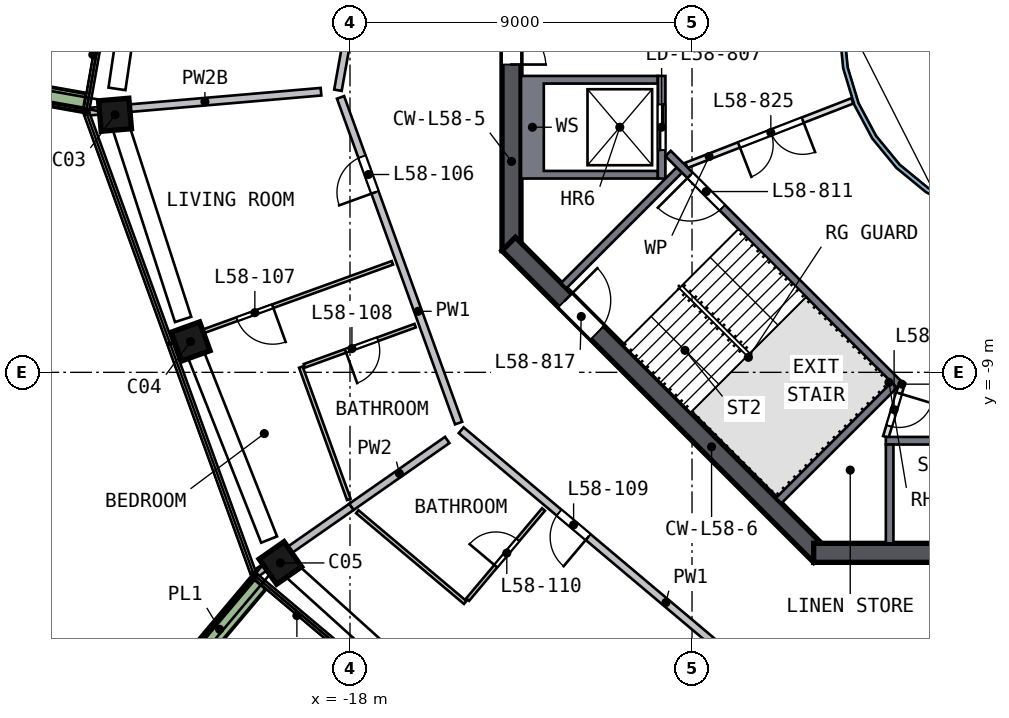
"""IFC4 building model, lengths in metres.
Left out: names, types, materials, properties, quantities, classifications, styles, units other than length and angle.
Written with IfcOpenShell. Run it as: python <this file> out.ifc"""

import sys

from ifc_helpers import new_model, si_unit, direction, frame, frame_2d, origin, origin_2d, place, context, subcontext, project, spatial, polyline, rectangle, outline, extrude, element, fill, save


model = new_model("IFC4")
c1 = context("Model", 3, precision=1e-05, world=origin(), true_north=direction((0.0, 1.0)))
c2 = subcontext(c1, "Body", "Model", "MODEL_VIEW")
j1 = project(units=[si_unit("LENGTHUNIT", "METRE"), si_unit("PLANEANGLEUNIT", "RADIAN")], contexts=[c1])
p1 = place(None, origin())
s1 = spatial("IfcSite", under=j1, at=p1, CompositionType="ELEMENT")
p2 = place(p1, origin())
s2 = spatial("IfcBuilding", under=s1, at=p2, CompositionType="ELEMENT")
p3 = place(p2, frame((0.0, 0.0, 237.5)))
s3 = spatial("IfcBuildingStorey", under=s2, at=p3, CompositionType="ELEMENT", Elevation=237.5)
p4 = place(p3, frame((-24.196, -2.083, 0.0), z_axis=(0.010795228, -0.114946373, 0.993313039), x_axis=(-0.084478949, 0.98971463, 0.115448074)))
e1 = element("IfcColumn", 1, at=p4, inside=s3, PredefinedType="COLUMN", context=c2, shape_type="SweptSolid", body=[
    extrude(rectangle(XDim=0.8, YDim=0.8, at=origin_2d()), origin(), (0.0, 0.0, 1.0), 3.211),
])
p5 = place(p3, frame((-22.243, -8.061, 0.0), z_axis=(0.039240919, -0.105478981, 0.993646987), x_axis=(0.338548583, -0.93419489, -0.112537837)))
e2 = element("IfcColumn", 2, at=p5, inside=s3, PredefinedType="COLUMN", context=c2, shape_type="SweptSolid", body=[
    extrude(rectangle(XDim=0.8, YDim=0.8, at=origin_2d()), origin(), (0.0, 0.0, 1.0), 3.21),
])
p6 = place(p3, frame((-19.913, -13.902, 0.0), z_axis=(0.066824181, -0.094116423, 0.993315976), x_axis=(-0.568164298, 0.814780281, 0.115422808)))
e3 = element("IfcColumn", 3, at=p6, inside=s3, PredefinedType="COLUMN", context=c2, shape_type="SweptSolid", body=[
    extrude(rectangle(XDim=0.8, YDim=0.8, at=origin_2d()), origin(), (0.0, 0.0, 1.0), 3.211),
])
p7 = place(p3, frame((-13.75, 5.799, 0.0), z_axis=(0.0, 0.0, 1.0), x_axis=(0.0, -1.0, 0.0)))
e4 = element("IfcWall", 4, at=p7, inside=s3, PredefinedType="SHEAR", context=c2, shape_type="SweptSolid", body=[
    extrude(rectangle(XDim=11.598, YDim=0.5, at=frame_2d((5.799, 0.0))), origin(), (0.0, 0.0, 1.0), 3.5),
])
p8 = place(p7, frame((4.899, 0.0, 0.0)))
e5 = element("IfcOpeningElement", 5, at=p8, cuts=e4, PredefinedType="OPENING", context=c2, shape_type="SweptSolid", body=[
    extrude(rectangle(XDim=1.8, YDim=2.1, at=frame_2d((0.9, 1.05))), frame((0.0, 0.26, 0.0), z_axis=(0.0, -1.0, 0.0), x_axis=(1.0, 0.0, 0.0)), (0.0, 0.0, 1.0), 0.52),
])
p9 = place(p3, frame((-13.823, -5.622, 0.0), z_axis=(0.0, 0.0, 1.0), x_axis=(0.707106781, -0.707106781, 0.0)))
e6 = element("IfcWall", 6, at=p9, inside=s3, PredefinedType="SHEAR", context=c2, shape_type="SweptSolid", body=[
    extrude(rectangle(XDim=11.598, YDim=0.5, at=frame_2d((5.799, 0.0))), origin(), (0.0, 0.0, 1.0), 3.5),
])
p10 = place(p9, frame((2.099, 0.0, 0.0)))
e7 = element("IfcOpeningElement", 7, at=p10, cuts=e6, PredefinedType="OPENING", context=c2, shape_type="SweptSolid", body=[
    extrude(rectangle(XDim=1.2, YDim=2.1, at=frame_2d((0.6, 1.05))), frame((0.0, 0.26, 0.0), z_axis=(0.0, -1.0, 0.0), x_axis=(1.0, 0.0, 0.0)), (0.0, 0.0, 1.0), 0.52),
])
p11 = place(p3, frame((-5.799, -13.75, 0.0), z_axis=(0.0, 0.0, 1.0), x_axis=(1.0, 0.0, 0.0)))
e8 = element("IfcWall", 8, at=p11, inside=s3, PredefinedType="SHEAR", context=c2, shape_type="SweptSolid", body=[
    extrude(rectangle(XDim=11.598, YDim=0.5, at=frame_2d((5.799, 0.0))), origin(), (0.0, 0.0, 1.0), 3.5),
])
p12 = place(p3, frame((-25.974, 9.343, 0.0), z_axis=(0.0, 0.0, 1.0), x_axis=(-0.175017773, -0.984565274, 0.0)))
e9 = element("IfcWall", 9, at=p12, inside=s3, PredefinedType="SOLIDWALL", context=c2, shape_type="SweptSolid", body=[
    extrude(rectangle(XDim=11.153, YDim=0.5, at=frame_2d((5.576, 0.0))), origin(), (0.0, 0.0, 1.0), 0.7),
])
p13 = place(p3, frame((-27.636, -1.435, 0.0), z_axis=(0.0, 0.0, 1.0), x_axis=(0.984577054, -0.174951491, 0.0)))
e10 = element("IfcWall", 10, at=p13, inside=s3, PredefinedType="SOLIDWALL", context=c2, shape_type="SweptSolid", body=[
    extrude(rectangle(XDim=2.699, YDim=0.5, at=frame_2d((1.349, 0.0))), origin(), (0.0, 0.0, 1.0), 0.7),
])
p14 = place(p3, frame((-20.402, -14.538, 0.0), z_axis=(0.0, 0.0, 1.0), x_axis=(-0.64387015, -0.765134779, 0.0)))
e11 = element("IfcWall", 11, at=p14, inside=s3, PredefinedType="SOLIDWALL", context=c2, shape_type="SweptSolid", body=[
    extrude(rectangle(XDim=3.199, YDim=0.5, at=frame_2d((1.6, 0.0))), origin(), (0.0, 0.0, 1.0), 0.7),
])
p15 = place(p3, origin())
e12 = element("IfcWall", 12, at=p15, inside=s3, PredefinedType="SOLIDWALL", context=c2, shape_type="SweptSolid", body=[
    extrude(outline(polyline([(-13.5, -3.9), (-13.5, -1.2), (-9.9, -1.2), (-9.9, -1.4), (-12.9, -1.4), (-12.9, -3.7), (-9.9, -3.7), (-9.9, -3.9), (-13.5, -3.9)])), origin(), (0.0, 0.0, 1.0), 3.19),
])
p16 = place(p3, frame((-9.8, -1.2, 0.0), z_axis=(0.0, 0.0, 1.0), x_axis=(0.0, -1.0, 0.0)))
e13 = element("IfcWall", 13, at=p16, inside=s3, PredefinedType="SOLIDWALL", context=c2, shape_type="SweptSolid", body=[
    extrude(rectangle(XDim=2.7, YDim=0.2, at=frame_2d((1.35, 0.0))), origin(), (0.0, 0.0, 1.0), 3.19),
])
p17 = place(p16, frame((0.75, 0.0, 0.0)))
e14 = element("IfcOpeningElement", 14, at=p17, cuts=e13, PredefinedType="OPENING", context=c2, shape_type="SweptSolid", body=[
    extrude(rectangle(XDim=1.2, YDim=2.1, at=frame_2d((0.6, 1.05))), frame((0.0, 0.11, 0.0), z_axis=(0.0, -1.0, 0.0), x_axis=(1.0, 0.0, 0.0)), (0.0, 0.0, 1.0), 0.22),
])
p18 = place(p3, frame((-3.9, -10.8, 0.0), z_axis=(0.0, 0.0, 1.0), x_axis=(1.0, 0.0, 0.0)))
e15 = element("IfcWall", 15, at=p18, inside=s3, PredefinedType="SOLIDWALL", context=c2, shape_type="SweptSolid", body=[
    extrude(rectangle(XDim=7.8, YDim=0.2, at=frame_2d((3.9, 0.0))), origin(), (0.0, 0.0, 1.0), 3.19),
])
p19 = place(p18, frame((3.45, 0.0, 0.0)))
e16 = element("IfcOpeningElement", 16, at=p19, cuts=e15, PredefinedType="OPENING", context=c2, shape_type="SweptSolid", body=[
    extrude(rectangle(XDim=0.9, YDim=2.1, at=frame_2d((0.45, 1.05))), frame((0.0, 0.11, 0.0), z_axis=(0.0, -1.0, 0.0), x_axis=(1.0, 0.0, 0.0)), (0.0, 0.0, 1.0), 0.22),
])
p20 = place(p3, frame((-3.8, -10.9, 0.0), z_axis=(0.0, 0.0, 1.0), x_axis=(0.0, -1.0, 0.0)))
e17 = element("IfcWall", 17, at=p20, inside=s3, PredefinedType="SOLIDWALL", context=c2, shape_type="SweptSolid", body=[
    extrude(rectangle(XDim=2.6, YDim=0.2, at=frame_2d((1.3, 0.0))), origin(), (0.0, 0.0, 1.0), 3.19),
])
p21 = place(p3, frame((-3.535, -9.334, 0.0), z_axis=(0.0, 0.0, 1.0), x_axis=(-0.707120946, 0.707092617, 0.0)))
e18 = element("IfcWall", 18, at=p21, inside=s3, PredefinedType="SOLIDWALL", context=c2, shape_type="SweptSolid", body=[
    extrude(rectangle(XDim=8.618, YDim=0.2, at=frame_2d((4.309, 0.0))), origin(), (0.0, 0.0, 1.0), 3.19),
])
p22 = place(p21, frame((6.6, 0.0, 0.0)))
e19 = element("IfcOpeningElement", 19, at=p22, cuts=e18, PredefinedType="OPENING", context=c2, shape_type="SweptSolid", body=[
    extrude(rectangle(XDim=1.2, YDim=2.1, at=frame_2d((0.6, 1.05))), frame((0.0, 0.11, 0.0), z_axis=(0.0, -1.0, 0.0), x_axis=(1.0, 0.0, 0.0)), (0.0, 0.0, 1.0), 0.22),
])
for number, where, z_axis, x_axis in (
    (20, (-9.334, -3.677, 0.0), (0.0, 0.0, 1.0), (-0.707, -0.707, 0.0)),
    (21, (-3.677, -9.334, 0.0), (0.0, 0.0, 1.0), (-0.707, -0.707, 0.0)),
):
    element("IfcWall", number, at=place(p3, frame(where, z_axis=z_axis, x_axis=x_axis)), inside=s3, PredefinedType="SOLIDWALL", context=c2, shape_type="SweptSolid", body=[
        extrude(rectangle(XDim=4.3, YDim=0.2, at=frame_2d((2.15, 0.0))), origin(), (0.0, 0.0, 1.0), 3.19),
    ])
p23 = place(p3, frame((-3.465, -9.263, 0.0), z_axis=(0.0, 0.0, 1.0), x_axis=(-0.289808785, -0.957084567, 0.0)))
e22 = element("IfcWall", 22, at=p23, inside=s3, PredefinedType="PARTITIONING", context=c2, shape_type="SweptSolid", body=[
    extrude(rectangle(XDim=1.501, YDim=0.15, at=frame_2d((0.75, 0.0))), origin(), (0.0, 0.0, 1.0), 3.19),
])
p24 = place(p23, frame((0.301, 0.0, 0.0)))
e23 = element("IfcOpeningElement", 23, at=p24, cuts=e22, PredefinedType="OPENING", context=c2, shape_type="SweptSolid", body=[
    extrude(rectangle(XDim=0.9, YDim=2.1, at=frame_2d((0.45, 1.05))), frame((0.0, 0.085, 0.0), z_axis=(0.0, -1.0, 0.0), x_axis=(1.0, 0.0, 0.0)), (0.0, 0.0, 1.0), 0.17),
])
p25 = place(p3, frame((-4.782, -1.857, 0.0), z_axis=(0.0, 0.0, 1.0), x_axis=(-0.932155279, -0.362058746, 0.0)))
e24 = element("IfcWall", 24, at=p25, inside=s3, PredefinedType="PARTITIONING", context=c2, shape_type="SweptSolid", body=[
    extrude(rectangle(XDim=4.682, YDim=0.15, at=frame_2d((2.341, 0.0))), origin(), (0.0, 0.0, 1.0), 3.19),
])
p26 = place(p25, frame((1.4, 0.0, 0.0)))
e25 = element("IfcOpeningElement", 25, at=p26, cuts=e24, PredefinedType="OPENING", context=c2, shape_type="SweptSolid", body=[
    extrude(rectangle(XDim=1.8, YDim=2.1, at=frame_2d((0.9, 1.05))), frame((0.0, 0.085, 0.0), z_axis=(0.0, -1.0, 0.0), x_axis=(1.0, 0.0, 0.0)), (0.0, 0.0, 1.0), 0.17),
])
p27 = place(p3, origin())
e26 = element("IfcWall", 26, at=p27, inside=s3, PredefinedType="SOLIDWALL", context=c2, shape_type="SweptSolid", body=[
    extrude(outline(polyline([(5.021, -0.999), (4.73, -1.959), (4.257, -2.844), (3.62, -3.62), (2.844, -4.257), (1.959, -4.73), (0.999, -5.021), (0.0, -5.12), (-0.999, -5.021), (-1.959, -4.73), (-2.844, -4.257), (-3.62, -3.62), (-4.257, -2.844), (-4.73, -1.959), (-5.021, -0.999), (-5.12, 0.0), (-5.021, 0.999), (-4.73, 1.959), (-4.257, 2.844), (-3.62, 3.62), (-2.844, 4.257), (-1.959, 4.73), (-0.999, 5.021), (0.0, 5.12), (0.999, 5.021), (1.959, 4.73), (2.844, 4.257), (3.62, 3.62), (4.257, 2.844), (4.73, 1.959), (5.021, 0.999), (5.12, 0.0), (5.021, -0.999)]), holes=[polyline([(4.904, 0.976), (4.619, 1.913), (4.157, 2.778), (3.535, 3.535), (2.778, 4.157), (1.913, 4.619), (0.976, 4.904), (0.0, 5.0), (-0.976, 4.904), (-1.913, 4.619), (-2.778, 4.157), (-3.535, 3.535), (-4.157, 2.778), (-4.619, 1.913), (-4.904, 0.976), (-5.0, 0.0), (-4.904, -0.976), (-4.619, -1.913), (-4.157, -2.778), (-3.535, -3.535), (-2.778, -4.157), (-1.913, -4.619), (-0.976, -4.904), (0.0, -5.0), (0.976, -4.904), (1.913, -4.619), (2.778, -4.157), (3.535, -3.535), (4.157, -2.778), (4.619, -1.913), (4.904, -0.976), (5.0, 0.0), (4.904, 0.976)])]), origin(), (0.0, 0.0, 1.0), 3.19),
])
p28 = place(p3, frame((-18.317, -1.577, 0.0), z_axis=(0.0, 0.0, 1.0), x_axis=(0.175025996, 0.984563812, 0.0)))
e27 = element("IfcWall", 27, at=p28, inside=s3, PredefinedType="SOLIDWALL", context=c2, shape_type="SweptSolid", body=[
    extrude(rectangle(XDim=9.316, YDim=0.2, at=frame_2d((4.658, 0.0))), origin(), (0.0, 0.0, 1.0), 3.19),
])
p29 = place(p28, frame((5.15, 0.0, 0.0)))
e28 = element("IfcOpeningElement", 28, at=p29, cuts=e27, PredefinedType="OPENING", context=c2, shape_type="SweptSolid", body=[
    extrude(rectangle(XDim=1.0, YDim=2.1, at=frame_2d((0.5, 1.05))), frame((0.0, 0.11, 0.0), z_axis=(0.0, -1.0, 0.0), x_axis=(1.0, 0.0, 0.0)), (0.0, 0.0, 1.0), 0.22),
])
p30 = place(p3, frame((-15.143, -10.336, 0.0), z_axis=(0.0, 0.0, 1.0), x_axis=(-0.340697837, 0.940172848, 0.0)))
e29 = element("IfcWall", 29, at=p30, inside=s3, PredefinedType="SOLIDWALL", context=c2, shape_type="SweptSolid", body=[
    extrude(rectangle(XDim=9.116, YDim=0.2, at=frame_2d((4.558, 0.0))), origin(), (0.0, 0.0, 1.0), 3.19),
])
p31 = place(p30, frame((6.458, 0.0, 0.0)))
e30 = element("IfcOpeningElement", 30, at=p31, cuts=e29, PredefinedType="OPENING", context=c2, shape_type="SweptSolid", body=[
    extrude(rectangle(XDim=1.0, YDim=2.1, at=frame_2d((0.5, 1.05))), frame((0.0, 0.11, 0.0), z_axis=(0.0, -1.0, 0.0), x_axis=(1.0, 0.0, 0.0)), (0.0, 0.0, 1.0), 0.22),
])
p32 = place(p3, frame((-7.793, -16.651, 0.0), z_axis=(0.0, 0.0, 1.0), x_axis=(-0.765159283, 0.643841029, 0.0)))
e31 = element("IfcWall", 31, at=p32, inside=s3, PredefinedType="SOLIDWALL", context=c2, shape_type="SweptSolid", body=[
    extrude(rectangle(XDim=9.517, YDim=0.2, at=frame_2d((4.758, 0.0))), origin(), (0.0, 0.0, 1.0), 3.19),
])
p33 = place(p32, frame((5.15, 0.0, 0.0)))
e32 = element("IfcOpeningElement", 32, at=p33, cuts=e31, PredefinedType="OPENING", context=c2, shape_type="SweptSolid", body=[
    extrude(rectangle(XDim=1.0, YDim=2.1, at=frame_2d((0.5, 1.05))), frame((0.0, 0.11, 0.0), z_axis=(0.0, -1.0, 0.0), x_axis=(1.0, 0.0, 0.0)), (0.0, 0.0, 1.0), 0.22),
])
p34 = place(p3, frame((-18.763, -1.615, 0.0), z_axis=(0.0, 0.0, 1.0), x_axis=(-0.996312401, -0.085799761, 0.0)))
e33 = element("IfcWall", 33, at=p34, inside=s3, PredefinedType="SOLIDWALL", context=c2, shape_type="SweptSolid", body=[
    extrude(rectangle(XDim=6.132, YDim=0.2, at=frame_2d((3.066, 0.0))), origin(), (0.0, 0.0, 1.0), 2.69),
])
p35 = place(p3, frame((-17.961, -12.539, 0.0), z_axis=(0.0, 0.0, 1.0), x_axis=(-0.819962324, -0.572417494, 0.0)))
e34 = element("IfcWall", 34, at=p35, inside=s3, PredefinedType="SOLIDWALL", context=c2, shape_type="SweptSolid", body=[
    extrude(rectangle(XDim=3.059, YDim=0.2, at=frame_2d((1.53, 0.0))), origin(), (0.0, 0.0, 1.0), 3.19),
])
p36 = place(p3, frame((-15.441, -10.78, 0.0), z_axis=(0.0, 0.0, 1.0), x_axis=(-0.819914454, -0.572486059, 0.0)))
e35 = element("IfcWall", 35, at=p36, inside=s3, PredefinedType="SOLIDWALL", context=c2, shape_type="SweptSolid", body=[
    extrude(rectangle(XDim=3.073, YDim=0.2, at=frame_2d((1.536, 0.0))), origin(), (0.0, 0.0, 1.0), 3.19),
])
p37 = place(p3, frame((-16.884, -6.118, 0.0), z_axis=(0.0, 0.0, 1.0), x_axis=(-0.940167222, -0.340713362, 0.0)))
e36 = element("IfcWall", 36, at=p37, inside=s3, PredefinedType="PARTITIONING", context=c2, shape_type="SweptSolid", body=[
    extrude(rectangle(XDim=6.15, YDim=0.1, at=frame_2d((3.075, 0.0))), origin(), (0.0, 0.0, 1.0), 3.19),
])
p38 = place(p37, frame((3.35, 0.0, 0.0)))
e37 = element("IfcOpeningElement", 37, at=p38, cuts=e36, PredefinedType="OPENING", context=c2, shape_type="SweptSolid", body=[
    extrude(rectangle(XDim=1.0, YDim=2.1, at=frame_2d((0.5, 1.05))), frame((0.0, 0.06, 0.0), z_axis=(0.0, -1.0, 0.0), x_axis=(1.0, 0.0, 0.0)), (0.0, 0.0, 1.0), 0.12),
])
p39 = place(p3, frame((-19.293, -8.862, 0.0), z_axis=(0.0, 0.0, 1.0), x_axis=(0.340642022, -0.940193072, 0.0)))
e38 = element("IfcWall", 38, at=p39, inside=s3, PredefinedType="PARTITIONING", context=c2, shape_type="SweptSolid", body=[
    extrude(rectangle(XDim=3.704, YDim=0.1, at=frame_2d((1.852, 0.0))), origin(), (0.0, 0.0, 1.0), 3.19),
])
p40 = place(p3, frame((-16.285, -7.772, 0.0), z_axis=(0.0, 0.0, 1.0), x_axis=(-0.940165397, -0.340718397, 0.0)))
e39 = element("IfcWall", 39, at=p40, inside=s3, PredefinedType="PARTITIONING", context=c2, shape_type="SweptSolid", body=[
    extrude(rectangle(XDim=3.1, YDim=0.1, at=frame_2d((1.55, 0.0))), origin(), (0.0, 0.0, 1.0), 3.19),
])
p41 = place(p40, frame((1.05, 0.0, 0.0)))
e40 = element("IfcOpeningElement", 40, at=p41, cuts=e39, PredefinedType="OPENING", context=c2, shape_type="SweptSolid", body=[
    extrude(rectangle(XDim=0.9, YDim=2.1, at=frame_2d((0.45, 1.05))), frame((0.0, 0.06, 0.0), z_axis=(0.0, -1.0, 0.0), x_axis=(1.0, 0.0, 0.0)), (0.0, 0.0, 1.0), 0.12),
])
p42 = place(p3, frame((-14.968, -15.057, 0.0), z_axis=(0.0, 0.0, 1.0), x_axis=(-0.765155095, 0.643846007, 0.0)))
e41 = element("IfcWall", 41, at=p42, inside=s3, PredefinedType="PARTITIONING", context=c2, shape_type="SweptSolid", body=[
    extrude(rectangle(XDim=3.711, YDim=0.1, at=frame_2d((1.855, 0.0))), origin(), (0.0, 0.0, 1.0), 3.19),
])
p43 = place(p3, frame((-14.904, -14.981, 0.0), z_axis=(0.0, 0.0, 1.0), x_axis=(0.643817992, 0.765178668, 0.0)))
e42 = element("IfcWall", 42, at=p43, inside=s3, PredefinedType="PARTITIONING", context=c2, shape_type="SweptSolid", body=[
    extrude(rectangle(XDim=3.1, YDim=0.1, at=frame_2d((1.55, 0.0))), origin(), (0.0, 0.0, 1.0), 3.19),
])
p44 = place(p43, frame((1.15, 0.0, 0.0)))
e43 = element("IfcOpeningElement", 43, at=p44, cuts=e42, PredefinedType="OPENING", context=c2, shape_type="SweptSolid", body=[
    extrude(rectangle(XDim=0.9, YDim=2.1, at=frame_2d((0.45, 1.05))), frame((0.0, 0.06, 0.0), z_axis=(0.0, -1.0, 0.0), x_axis=(1.0, 0.0, 0.0)), (0.0, 0.0, 1.0), 0.12),
])
p45 = place(p17, origin())
e44 = element("IfcDoor", 44, at=p45, inside=s3, OperationType="DOUBLE_DOOR_SLIDING", PredefinedType="DOOR", context=c2, shape_type="SweptSolid", body=[
    extrude(rectangle(XDim=1.2, YDim=2.1, at=frame_2d((0.6, 1.05))), frame((0.0, 0.025, 0.0), z_axis=(0.0, -1.0, 0.0), x_axis=(1.0, 0.0, 0.0)), (0.0, 0.0, 1.0), 0.05),
])
fill(e14, e44)
p46 = place(p22, origin())
e45 = element("IfcDoor", 45, at=p46, inside=s3, OperationType="SINGLE_SWING_RIGHT", PredefinedType="DOOR", context=c2, shape_type="SweptSolid", body=[
    extrude(rectangle(XDim=1.2, YDim=2.1, at=frame_2d((0.6, 1.05))), frame((0.0, 0.025, 0.0), z_axis=(0.0, -1.0, 0.0), x_axis=(1.0, 0.0, 0.0)), (0.0, 0.0, 1.0), 0.05),
])
fill(e19, e45)
p47 = place(p8, origin())
e46 = element("IfcDoor", 46, at=p47, inside=s3, OperationType="DOUBLE_DOOR_SINGLE_SWING", PredefinedType="DOOR", context=c2, shape_type="SweptSolid", body=[
    extrude(rectangle(XDim=1.8, YDim=2.1, at=frame_2d((0.9, 1.05))), frame((0.0, 0.025, 0.0), z_axis=(0.0, -1.0, 0.0), x_axis=(1.0, 0.0, 0.0)), (0.0, 0.0, 1.0), 0.05),
])
fill(e5, e46)
p48 = place(p10, origin())
e47 = element("IfcDoor", 47, at=p48, inside=s3, OperationType="SINGLE_SWING_LEFT", PredefinedType="DOOR", context=c2, shape_type="SweptSolid", body=[
    extrude(rectangle(XDim=1.2, YDim=2.1, at=frame_2d((0.6, 1.05))), frame((0.0, 0.025, 0.0), z_axis=(0.0, -1.0, 0.0), x_axis=(1.0, 0.0, 0.0)), (0.0, 0.0, 1.0), 0.05),
])
fill(e7, e47)
p49 = place(p24, origin())
e48 = element("IfcDoor", 48, at=p49, inside=s3, OperationType="SINGLE_SWING_LEFT", PredefinedType="DOOR", context=c2, shape_type="SweptSolid", body=[
    extrude(rectangle(XDim=0.9, YDim=2.1, at=frame_2d((0.45, 1.05))), frame((0.0, 0.025, 0.0), z_axis=(0.0, -1.0, 0.0), x_axis=(1.0, 0.0, 0.0)), (0.0, 0.0, 1.0), 0.05),
])
fill(e23, e48)
p50 = place(p26, origin())
e49 = element("IfcDoor", 49, at=p50, inside=s3, OperationType="DOUBLE_DOOR_SINGLE_SWING", PredefinedType="DOOR", context=c2, shape_type="SweptSolid", body=[
    extrude(rectangle(XDim=1.8, YDim=2.1, at=frame_2d((0.9, 1.05))), frame((0.0, 0.025, 0.0), z_axis=(0.0, -1.0, 0.0), x_axis=(1.0, 0.0, 0.0)), (0.0, 0.0, 1.0), 0.05),
])
fill(e25, e49)
p51 = place(p31, origin())
e50 = element("IfcDoor", 50, at=p51, inside=s3, OperationType="SINGLE_SWING_LEFT", PredefinedType="DOOR", context=c2, shape_type="SweptSolid", body=[
    extrude(rectangle(XDim=1.0, YDim=2.1, at=frame_2d((0.5, 1.05))), frame((0.0, 0.025, 0.0), z_axis=(0.0, -1.0, 0.0), x_axis=(1.0, 0.0, 0.0)), (0.0, 0.0, 1.0), 0.05),
])
fill(e30, e50)
p52 = place(p38, origin())
e51 = element("IfcDoor", 51, at=p52, inside=s3, OperationType="SINGLE_SWING_LEFT", PredefinedType="DOOR", context=c2, shape_type="SweptSolid", body=[
    extrude(rectangle(XDim=1.0, YDim=2.1, at=frame_2d((0.5, 1.05))), frame((0.0, 0.025, 0.0), z_axis=(0.0, -1.0, 0.0), x_axis=(1.0, 0.0, 0.0)), (0.0, 0.0, 1.0), 0.05),
])
fill(e37, e51)
p53 = place(p41, origin())
e52 = element("IfcDoor", 52, at=p53, inside=s3, OperationType="SINGLE_SWING_RIGHT", PredefinedType="DOOR", context=c2, shape_type="SweptSolid", body=[
    extrude(rectangle(XDim=0.9, YDim=2.1, at=frame_2d((0.45, 1.05))), frame((0.0, 0.025, 0.0), z_axis=(0.0, -1.0, 0.0), x_axis=(1.0, 0.0, 0.0)), (0.0, 0.0, 1.0), 0.05),
])
fill(e40, e52)
p54 = place(p33, origin())
e53 = element("IfcDoor", 53, at=p54, inside=s3, OperationType="SINGLE_SWING_LEFT", PredefinedType="DOOR", context=c2, shape_type="SweptSolid", body=[
    extrude(rectangle(XDim=1.0, YDim=2.1, at=frame_2d((0.5, 1.05))), frame((0.0, 0.025, 0.0), z_axis=(0.0, -1.0, 0.0), x_axis=(1.0, 0.0, 0.0)), (0.0, 0.0, 1.0), 0.05),
])
fill(e32, e53)
p55 = place(p44, origin())
e54 = element("IfcDoor", 54, at=p55, inside=s3, OperationType="SINGLE_SWING_LEFT", PredefinedType="DOOR", context=c2, shape_type="SweptSolid", body=[
    extrude(rectangle(XDim=0.9, YDim=2.1, at=frame_2d((0.45, 1.05))), frame((0.0, 0.025, 0.0), z_axis=(0.0, -1.0, 0.0), x_axis=(1.0, 0.0, 0.0)), (0.0, 0.0, 1.0), 0.05),
])
fill(e43, e54)
save(model, sys.argv[1])
